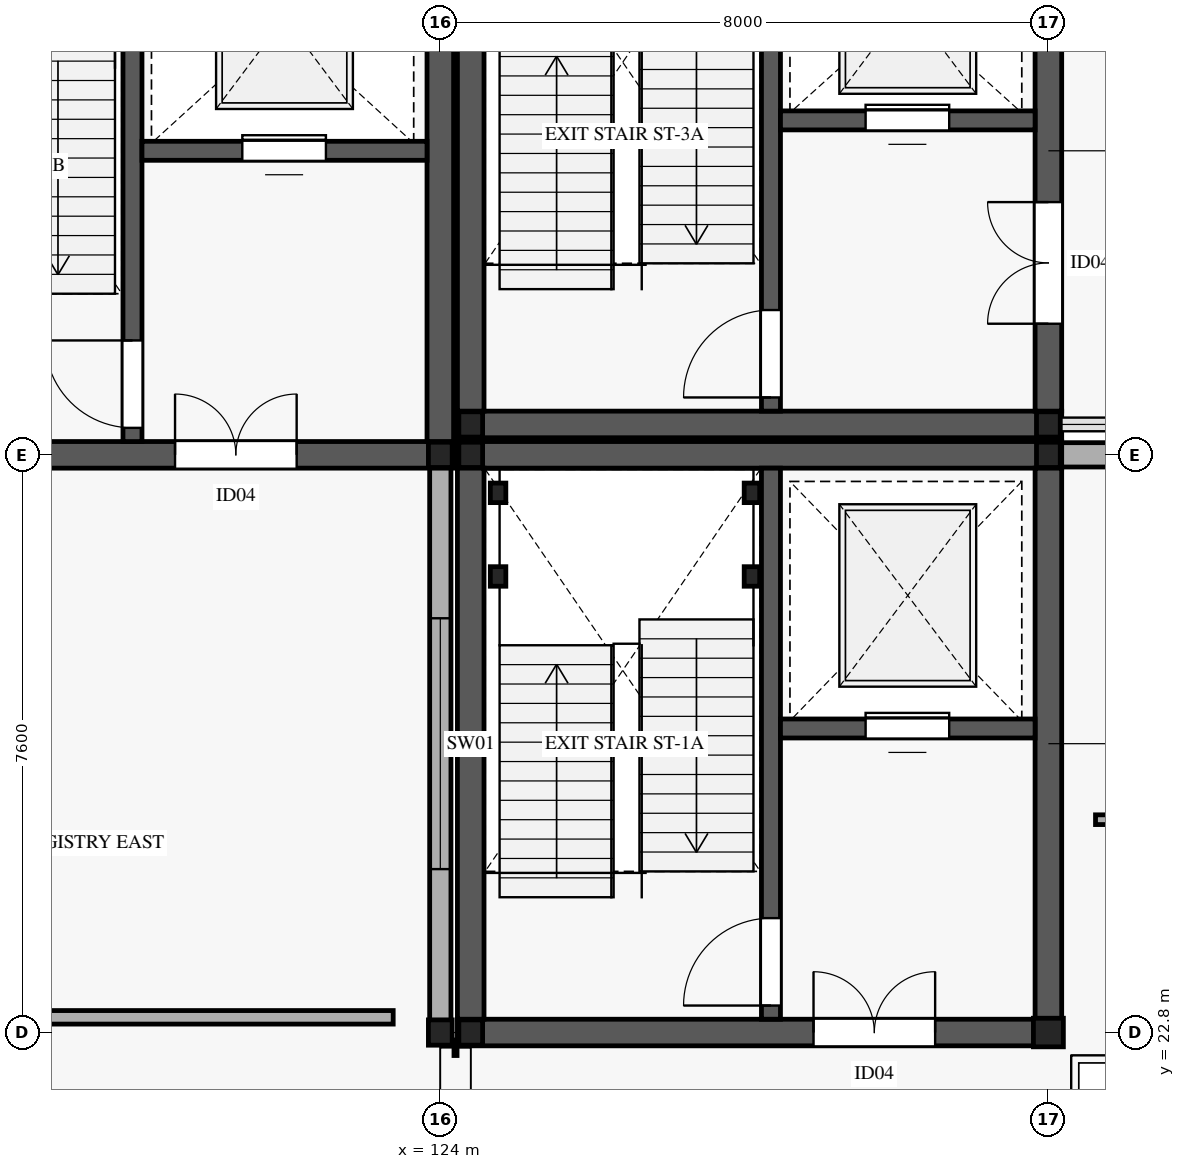
"""IFC4 building model, lengths in metres.
Left out: names, types, materials, properties, quantities, classifications, styles, units other than length and angle.
Written with IfcOpenShell. Run it as: python <this file> out.ifc"""

import sys

from ifc_helpers import new_model, si_unit, direction, frame, frame_2d, origin, origin_2d, place, context, subcontext, project, spatial, rectangle, i_section, extrude, element, fill, save


model = new_model("IFC4")
c1 = context("Model", 3, precision=1e-05, world=origin(), true_north=direction((0.0, 1.0)))
c2 = subcontext(c1, "Body", "Model", "MODEL_VIEW")
j1 = project(units=[si_unit("LENGTHUNIT", "METRE"), si_unit("PLANEANGLEUNIT", "RADIAN")], contexts=[c1])
p1 = place(None, origin())
s1 = spatial("IfcSite", under=j1, at=p1, CompositionType="ELEMENT")
p2 = place(p1, origin())
s2 = spatial("IfcBuilding", under=s1, at=p2, CompositionType="ELEMENT")
p3 = place(p2, frame((0.0, 0.0, 10.8)))
s3 = spatial("IfcBuildingStorey", under=s2, at=p3, CompositionType="ELEMENT", Elevation=10.8)
for number, where, z_axis, x_axis in (
    (1, (124.4, 22.8, 0.0), (0.0, 0.0, 1.0), (1.0, 0.0, 0.0)),
    (2, (124.4, 30.4, 0.0), (0.0, 0.0, 1.0), (1.0, 0.0, 0.0)),
):
    element("IfcColumn", number, at=place(p3, frame(where, z_axis=z_axis, x_axis=x_axis)), inside=s3, PredefinedType="COLUMN", context=c2, shape_type="SweptSolid", body=[
        extrude(i_section(OverallWidth=0.313, OverallDepth=0.333, WebThickness=0.018, FlangeThickness=0.028, FilletRadius=0.015, at=origin_2d()), origin(), (0.0, 0.0, 1.0), 4.59),
    ])
p4 = place(p3, frame((132.0, 22.8, 0.0), z_axis=(0.0, 0.0, 1.0), x_axis=(1.0, 0.0, 0.0)))
e3 = element("IfcColumn", 3, at=p4, inside=s3, PredefinedType="COLUMN", context=c2, shape_type="SweptSolid", body=[
    extrude(i_section(OverallWidth=0.394, OverallDepth=0.376, WebThickness=0.017, FlangeThickness=0.028, FilletRadius=0.015, at=origin_2d()), origin(), (0.0, 0.0, 1.0), 4.59),
])
for number, where, z_axis, x_axis in (
    (4, (132.0, 30.4, 0.0), (0.0, 0.0, 1.0), (1.0, 0.0, 0.0)),
    (5, (124.4, 30.8, 0.0), (0.0, 0.0, 1.0), (1.0, 0.0, 0.0)),
    (6, (132.0, 30.8, 0.0), (0.0, 0.0, 1.0), (1.0, 0.0, 0.0)),
    (7, (124.0, 22.8, 0.0), (0.0, 0.0, 1.0), (1.0, 0.0, 0.0)),
    (8, (124.0, 30.4, 0.0), (0.0, 0.0, 1.0), (1.0, 0.0, 0.0)),
):
    element("IfcColumn", number, at=place(p3, frame(where, z_axis=z_axis, x_axis=x_axis)), inside=s3, PredefinedType="COLUMN", context=c2, shape_type="SweptSolid", body=[
        extrude(i_section(OverallWidth=0.313, OverallDepth=0.333, WebThickness=0.018, FlangeThickness=0.028, FilletRadius=0.015, at=origin_2d()), origin(), (0.0, 0.0, 1.0), 4.59),
    ])
p5 = place(p3, frame((131.98, 30.4, 0.0), z_axis=(0.0, 0.0, 1.0), x_axis=(1.0, 0.0, 0.0)))
e9 = element("IfcWall", 9, at=p5, inside=s3, PredefinedType="STANDARD", context=c2, shape_type="SweptSolid", body=[
    extrude(rectangle(XDim=8.04, YDim=0.32, at=frame_2d((4.02, 0.0))), origin(), (0.0, 0.0, 1.0), 3.66),
])
p6 = place(p5, frame((3.37, 0.0, 0.75)))
e10 = element("IfcOpeningElement", 10, at=p6, cuts=e9, PredefinedType="OPENING", context=c2, shape_type="SweptSolid", body=[
    extrude(rectangle(XDim=1.3, YDim=1.55, at=frame_2d((0.65, 0.775))), frame((0.0, 0.17, 0.0), z_axis=(0.0, -1.0, 0.0), x_axis=(1.0, 0.0, 0.0)), (0.0, 0.0, 1.0), 0.34),
])
p7 = place(p3, frame((124.0, 30.42, 0.0), z_axis=(0.0, 0.0, 1.0), x_axis=(0.0, -1.0, 0.0)))
e11 = element("IfcWall", 11, at=p7, inside=s3, PredefinedType="STANDARD", context=c2, shape_type="SweptSolid", body=[
    extrude(rectangle(XDim=7.64, YDim=0.28, at=frame_2d((3.82, 0.0))), origin(), (0.0, 0.0, 1.0), 3.66),
])
p8 = place(p7, frame((2.17, 0.0, 0.75)))
e12 = element("IfcOpeningElement", 12, at=p8, cuts=e11, PredefinedType="OPENING", context=c2, shape_type="SweptSolid", body=[
    extrude(rectangle(XDim=3.3, YDim=2.15, at=frame_2d((1.65, 1.075))), frame((0.0, 0.15, 0.0), z_axis=(0.0, -1.0, 0.0), x_axis=(1.0, 0.0, 0.0)), (0.0, 0.0, 1.0), 0.3),
])
p9 = place(p3, frame((124.18, 22.6, 0.0), z_axis=(0.0, 0.0, 1.0), x_axis=(1.0, 0.0, 0.0)))
e13 = element("IfcWall", 13, at=p9, inside=s3, PredefinedType="STANDARD", context=c2, shape_type="SweptSolid", body=[
    extrude(rectangle(XDim=0.04, YDim=0.205, at=frame_2d((0.02, 0.0))), origin(), (0.0, 0.0, 1.0), 4.02),
])
p10 = place(p3, frame((124.225, 22.8, 0.0), z_axis=(0.0, 0.0, 1.0), x_axis=(1.0, 0.0, 0.0)))
e14 = element("IfcWall", 14, at=p10, inside=s3, PredefinedType="SHEAR", context=c2, shape_type="SweptSolid", body=[
    extrude(rectangle(XDim=7.95, YDim=0.35, at=frame_2d((3.975, 0.0))), origin(), (0.0, 0.0, 1.0), 4.59),
])
p11 = place(p10, frame((4.685, 0.0, 0.0)))
e15 = element("IfcOpeningElement", 15, at=p11, cuts=e14, PredefinedType="OPENING", context=c2, shape_type="SweptSolid", body=[
    extrude(rectangle(XDim=1.6, YDim=2.35, at=frame_2d((0.8, 1.175))), frame((0.0, 0.185, 0.0), z_axis=(0.0, -1.0, 0.0), x_axis=(1.0, 0.0, 0.0)), (0.0, 0.0, 1.0), 0.37),
])
p12 = place(p3, frame((124.225, 30.4, 0.0), z_axis=(0.0, 0.0, 1.0), x_axis=(1.0, 0.0, 0.0)))
e16 = element("IfcWall", 16, at=p12, inside=s3, PredefinedType="SHEAR", context=c2, shape_type="SweptSolid", body=[
    extrude(rectangle(XDim=7.95, YDim=0.35, at=frame_2d((3.975, 0.0))), origin(), (0.0, 0.0, 1.0), 4.59),
])
for number, where, z_axis, x_axis in (
    (17, (124.4, 22.975, 0.0), (0.0, 0.0, 1.0), (0.0, 1.0, 0.0)),
    (18, (132.0, 22.975, 0.0), (0.0, 0.0, 1.0), (0.0, 1.0, 0.0)),
):
    element("IfcWall", number, at=place(p3, frame(where, z_axis=z_axis, x_axis=x_axis)), inside=s3, PredefinedType="SHEAR", context=c2, shape_type="SweptSolid", body=[
        extrude(rectangle(XDim=7.25, YDim=0.35, at=frame_2d((3.625, 0.0))), origin(), (0.0, 0.0, 1.0), 4.59),
    ])
p13 = place(p3, frame((128.35, 22.975, 0.0), z_axis=(0.0, 0.0, 1.0), x_axis=(0.0, 1.0, 0.0)))
e19 = element("IfcWall", 19, at=p13, inside=s3, PredefinedType="SHEAR", context=c2, shape_type="SweptSolid", body=[
    extrude(rectangle(XDim=7.25, YDim=0.25, at=frame_2d((3.625, 0.0))), origin(), (0.0, 0.0, 1.0), 4.59),
])
p14 = place(p13, frame((0.18, 0.0, 0.0)))
e20 = element("IfcOpeningElement", 20, at=p14, cuts=e19, PredefinedType="OPENING", context=c2, shape_type="SweptSolid", body=[
    extrude(rectangle(XDim=1.15, YDim=2.2, at=frame_2d((0.575, 1.1))), frame((0.0, 0.135, 0.0), z_axis=(0.0, -1.0, 0.0), x_axis=(1.0, 0.0, 0.0)), (0.0, 0.0, 1.0), 0.27),
])
p15 = place(p3, frame((128.475, 26.8, 0.0), z_axis=(0.0, 0.0, 1.0), x_axis=(1.0, 0.0, 0.0)))
e21 = element("IfcWall", 21, at=p15, inside=s3, PredefinedType="SHEAR", context=c2, shape_type="SweptSolid", body=[
    extrude(rectangle(XDim=3.35, YDim=0.25, at=frame_2d((1.675, 0.0))), origin(), (0.0, 0.0, 1.0), 4.59),
])
p16 = place(p15, frame((1.12, 0.0, 0.0)))
e22 = element("IfcOpeningElement", 22, at=p16, cuts=e21, PredefinedType="OPENING", context=c2, shape_type="SweptSolid", body=[
    extrude(rectangle(XDim=1.1, YDim=2.2, at=frame_2d((0.55, 1.1))), frame((0.0, 0.135, 0.0), z_axis=(0.0, -1.0, 0.0), x_axis=(1.0, 0.0, 0.0)), (0.0, 0.0, 1.0), 0.27),
])
for number, where, z_axis, x_axis in (
    (23, (124.76, 28.8, 0.0), (0.0, 0.0, 1.0), (1.0, 0.0, 0.0)),
    (24, (128.1, 28.8, 0.0), (0.0, 0.0, 1.0), (1.0, 0.0, 0.0)),
    (25, (124.76, 29.9, 0.0), (0.0, 0.0, 1.0), (1.0, 0.0, 0.0)),
    (26, (128.1, 29.9, 0.0), (0.0, 0.0, 1.0), (1.0, 0.0, 0.0)),
):
    element("IfcColumn", number, at=place(p3, frame(where, z_axis=z_axis, x_axis=x_axis)), inside=s3, PredefinedType="COLUMN", context=c2, shape_type="SweptSolid", body=[
        extrude(i_section(OverallWidth=0.204, OverallDepth=0.257, WebThickness=0.009, FlangeThickness=0.016, FilletRadius=0.013, at=origin_2d()), origin(), (0.0, 0.0, 1.0), 4.795),
    ])
p17 = place(p3, frame((124.225, 30.8, 0.0), z_axis=(0.0, 0.0, 1.0), x_axis=(1.0, 0.0, 0.0)))
e27 = element("IfcWall", 27, at=p17, inside=s3, PredefinedType="SHEAR", context=c2, shape_type="SweptSolid", body=[
    extrude(rectangle(XDim=7.95, YDim=0.35, at=frame_2d((3.975, 0.0))), origin(), (0.0, 0.0, 1.0), 4.59),
])
p18 = place(p3, frame((124.4, 30.975, 0.0), z_axis=(0.0, 0.0, 1.0), x_axis=(0.0, 1.0, 0.0)))
e28 = element("IfcWall", 28, at=p18, inside=s3, PredefinedType="SHEAR", context=c2, shape_type="SweptSolid", body=[
    extrude(rectangle(XDim=6.85, YDim=0.35, at=frame_2d((3.425, 0.0))), origin(), (0.0, 0.0, 1.0), 4.59),
])
p19 = place(p3, frame((132.0, 30.975, 0.0), z_axis=(0.0, 0.0, 1.0), x_axis=(0.0, 1.0, 0.0)))
e29 = element("IfcWall", 29, at=p19, inside=s3, PredefinedType="SHEAR", context=c2, shape_type="SweptSolid", body=[
    extrude(rectangle(XDim=6.85, YDim=0.35, at=frame_2d((3.425, 0.0))), origin(), (0.0, 0.0, 1.0), 4.59),
])
p20 = place(p19, frame((1.15, 0.0, 0.0)))
e30 = element("IfcOpeningElement", 30, at=p20, cuts=e29, PredefinedType="OPENING", context=c2, shape_type="SweptSolid", body=[
    extrude(rectangle(XDim=1.6, YDim=2.35, at=frame_2d((0.8, 1.175))), frame((0.0, 0.185, 0.0), z_axis=(0.0, -1.0, 0.0), x_axis=(1.0, 0.0, 0.0)), (0.0, 0.0, 1.0), 0.37),
])
p21 = place(p3, frame((128.35, 30.975, 0.0), z_axis=(0.0, 0.0, 1.0), x_axis=(0.0, 1.0, 0.0)))
e31 = element("IfcWall", 31, at=p21, inside=s3, PredefinedType="SHEAR", context=c2, shape_type="SweptSolid", body=[
    extrude(rectangle(XDim=6.85, YDim=0.25, at=frame_2d((3.425, 0.0))), origin(), (0.0, 0.0, 1.0), 4.59),
])
p22 = place(p21, frame((0.18, 0.0, 0.0)))
e32 = element("IfcOpeningElement", 32, at=p22, cuts=e31, PredefinedType="OPENING", context=c2, shape_type="SweptSolid", body=[
    extrude(rectangle(XDim=1.15, YDim=2.2, at=frame_2d((0.575, 1.1))), frame((0.0, 0.135, 0.0), z_axis=(0.0, -1.0, 0.0), x_axis=(1.0, 0.0, 0.0)), (0.0, 0.0, 1.0), 0.27),
])
p23 = place(p3, frame((128.475, 34.8, 0.0), z_axis=(0.0, 0.0, 1.0), x_axis=(1.0, 0.0, 0.0)))
e33 = element("IfcWall", 33, at=p23, inside=s3, PredefinedType="SHEAR", context=c2, shape_type="SweptSolid", body=[
    extrude(rectangle(XDim=3.35, YDim=0.25, at=frame_2d((1.675, 0.0))), origin(), (0.0, 0.0, 1.0), 4.59),
])
p24 = place(p23, frame((1.12, 0.0, 0.0)))
e34 = element("IfcOpeningElement", 34, at=p24, cuts=e33, PredefinedType="OPENING", context=c2, shape_type="SweptSolid", body=[
    extrude(rectangle(XDim=1.1, YDim=2.2, at=frame_2d((0.55, 1.1))), frame((0.0, 0.135, 0.0), z_axis=(0.0, -1.0, 0.0), x_axis=(1.0, 0.0, 0.0)), (0.0, 0.0, 1.0), 0.27),
])
p25 = place(p3, frame((115.825, 30.4, 0.0), z_axis=(0.0, 0.0, 1.0), x_axis=(1.0, 0.0, 0.0)))
e35 = element("IfcWall", 35, at=p25, inside=s3, PredefinedType="SHEAR", context=c2, shape_type="SweptSolid", body=[
    extrude(rectangle(XDim=8.35, YDim=0.35, at=frame_2d((4.175, 0.0))), origin(), (0.0, 0.0, 1.0), 4.59),
])
p26 = place(p25, frame((4.685, 0.0, 0.0)))
e36 = element("IfcOpeningElement", 36, at=p26, cuts=e35, PredefinedType="OPENING", context=c2, shape_type="SweptSolid", body=[
    extrude(rectangle(XDim=1.6, YDim=2.35, at=frame_2d((0.8, 1.175))), frame((0.0, 0.185, 0.0), z_axis=(0.0, -1.0, 0.0), x_axis=(1.0, 0.0, 0.0)), (0.0, 0.0, 1.0), 0.37),
])
p27 = place(p3, frame((124.0, 30.575, 0.0), z_axis=(0.0, 0.0, 1.0), x_axis=(0.0, 1.0, 0.0)))
e37 = element("IfcWall", 37, at=p27, inside=s3, PredefinedType="SHEAR", context=c2, shape_type="SweptSolid", body=[
    extrude(rectangle(XDim=7.25, YDim=0.35, at=frame_2d((3.625, 0.0))), origin(), (0.0, 0.0, 1.0), 4.59),
])
p28 = place(p3, frame((119.95, 30.575, 0.0), z_axis=(0.0, 0.0, 1.0), x_axis=(0.0, 1.0, 0.0)))
e38 = element("IfcWall", 38, at=p28, inside=s3, PredefinedType="SHEAR", context=c2, shape_type="SweptSolid", body=[
    extrude(rectangle(XDim=7.25, YDim=0.25, at=frame_2d((3.625, 0.0))), origin(), (0.0, 0.0, 1.0), 4.59),
])
p29 = place(p28, frame((0.18, 0.0, 0.0)))
e39 = element("IfcOpeningElement", 39, at=p29, cuts=e38, PredefinedType="OPENING", context=c2, shape_type="SweptSolid", body=[
    extrude(rectangle(XDim=1.15, YDim=2.2, at=frame_2d((0.575, 1.1))), frame((0.0, 0.135, 0.0), z_axis=(0.0, -1.0, 0.0), x_axis=(1.0, 0.0, 0.0)), (0.0, 0.0, 1.0), 0.27),
])
p30 = place(p3, frame((120.075, 34.4, 0.0), z_axis=(0.0, 0.0, 1.0), x_axis=(1.0, 0.0, 0.0)))
e40 = element("IfcWall", 40, at=p30, inside=s3, PredefinedType="SHEAR", context=c2, shape_type="SweptSolid", body=[
    extrude(rectangle(XDim=3.75, YDim=0.25, at=frame_2d((1.875, 0.0))), origin(), (0.0, 0.0, 1.0), 4.59),
])
p31 = place(p30, frame((1.32, 0.0, 0.0)))
e41 = element("IfcOpeningElement", 41, at=p31, cuts=e40, PredefinedType="OPENING", context=c2, shape_type="SweptSolid", body=[
    extrude(rectangle(XDim=1.1, YDim=2.2, at=frame_2d((0.55, 1.1))), frame((0.0, 0.135, 0.0), z_axis=(0.0, -1.0, 0.0), x_axis=(1.0, 0.0, 0.0)), (0.0, 0.0, 1.0), 0.27),
])
p32 = place(p3, frame((132.62, 25.6, 0.0), z_axis=(0.0, 0.0, 1.0), x_axis=(1.0, 0.0, 0.0)))
e42 = element("IfcWall", 42, at=p32, inside=s3, PredefinedType="PARTITIONING", context=c2, shape_type="SweptSolid", body=[
    extrude(rectangle(XDim=30.76, YDim=0.128, at=frame_2d((15.38, 0.0))), origin(), (0.0, 0.0, 1.0), 3.45),
])
p33 = place(p32, frame((14.73, 0.0, 0.0)))
e43 = element("IfcOpeningElement", 43, at=p33, cuts=e42, PredefinedType="OPENING", context=c2, shape_type="SweptSolid", body=[
    extrude(rectangle(XDim=1.3, YDim=2.2, at=frame_2d((0.65, 1.1))), frame((0.0, 0.074, 0.0), z_axis=(0.0, -1.0, 0.0), x_axis=(1.0, 0.0, 0.0)), (0.0, 0.0, 1.0), 0.148),
])
p34 = place(p3, frame((111.62, 23.0, 0.0), z_axis=(0.0, 0.0, 1.0), x_axis=(1.0, 0.0, 0.0)))
e44 = element("IfcWall", 44, at=p34, inside=s3, PredefinedType="PARTITIONING", context=c2, shape_type="SweptSolid", body=[
    extrude(rectangle(XDim=11.76, YDim=0.178, at=frame_2d((5.88, 0.0))), origin(), (0.0, 0.0, 1.0), 3.45),
])
p35 = place(p34, frame((5.28, 0.0, 0.0)))
e45 = element("IfcOpeningElement", 45, at=p35, cuts=e44, PredefinedType="OPENING", context=c2, shape_type="SweptSolid", body=[
    extrude(rectangle(XDim=1.2, YDim=2.2, at=frame_2d((0.6, 1.1))), frame((0.0, 0.099, 0.0), z_axis=(0.0, -1.0, 0.0), x_axis=(1.0, 0.0, 0.0)), (0.0, 0.0, 1.0), 0.198),
])
p36 = place(p8, origin())
e46 = element("IfcWindow", 46, at=p36, inside=s3, PartitioningType="SINGLE_PANEL", PredefinedType="WINDOW", context=c2, shape_type="SweptSolid", body=[
    extrude(rectangle(XDim=3.3, YDim=2.15, at=frame_2d((1.65, 1.075))), frame((0.0, 0.03, 0.0), z_axis=(0.0, -1.0, 0.0), x_axis=(1.0, 0.0, 0.0)), (0.0, 0.0, 1.0), 0.06),
])
fill(e12, e46)
p37 = place(p14, origin())
e47 = element("IfcDoor", 47, at=p37, inside=s3, OperationType="SINGLE_SWING_LEFT", PredefinedType="DOOR", context=c2, shape_type="SweptSolid", body=[
    extrude(rectangle(XDim=1.15, YDim=2.2, at=frame_2d((0.575, 1.1))), frame((0.0, 0.025, 0.0), z_axis=(0.0, -1.0, 0.0), x_axis=(1.0, 0.0, 0.0)), (0.0, 0.0, 1.0), 0.05),
])
fill(e20, e47)
p38 = place(p11, origin())
e48 = element("IfcDoor", 48, at=p38, inside=s3, OperationType="DOUBLE_DOOR_SINGLE_SWING", PredefinedType="DOOR", context=c2, shape_type="SweptSolid", body=[
    extrude(rectangle(XDim=1.6, YDim=2.35, at=frame_2d((0.8, 1.175))), frame((0.0, 0.025, 0.0), z_axis=(0.0, -1.0, 0.0), x_axis=(1.0, 0.0, 0.0)), (0.0, 0.0, 1.0), 0.05),
])
fill(e15, e48)
p39 = place(p16, origin())
e49 = element("IfcDoor", 49, at=p39, inside=s3, OperationType="SLIDING_TO_LEFT", PredefinedType="DOOR", context=c2, shape_type="SweptSolid", body=[
    extrude(rectangle(XDim=1.1, YDim=2.2, at=frame_2d((0.55, 1.1))), frame((0.0, 0.025, 0.0), z_axis=(0.0, -1.0, 0.0), x_axis=(1.0, 0.0, 0.0)), (0.0, 0.0, 1.0), 0.05),
])
fill(e22, e49)
p40 = place(p22, origin())
e50 = element("IfcDoor", 50, at=p40, inside=s3, OperationType="SINGLE_SWING_LEFT", PredefinedType="DOOR", context=c2, shape_type="SweptSolid", body=[
    extrude(rectangle(XDim=1.15, YDim=2.2, at=frame_2d((0.575, 1.1))), frame((0.0, 0.025, 0.0), z_axis=(0.0, -1.0, 0.0), x_axis=(1.0, 0.0, 0.0)), (0.0, 0.0, 1.0), 0.05),
])
fill(e32, e50)
p41 = place(p20, origin())
e51 = element("IfcDoor", 51, at=p41, inside=s3, OperationType="DOUBLE_DOOR_SINGLE_SWING", PredefinedType="DOOR", context=c2, shape_type="SweptSolid", body=[
    extrude(rectangle(XDim=1.6, YDim=2.35, at=frame_2d((0.8, 1.175))), frame((0.0, 0.025, 0.0), z_axis=(0.0, -1.0, 0.0), x_axis=(1.0, 0.0, 0.0)), (0.0, 0.0, 1.0), 0.05),
])
fill(e30, e51)
p42 = place(p24, origin())
e52 = element("IfcDoor", 52, at=p42, inside=s3, OperationType="SLIDING_TO_LEFT", PredefinedType="DOOR", context=c2, shape_type="SweptSolid", body=[
    extrude(rectangle(XDim=1.1, YDim=2.2, at=frame_2d((0.55, 1.1))), frame((0.0, 0.025, 0.0), z_axis=(0.0, -1.0, 0.0), x_axis=(1.0, 0.0, 0.0)), (0.0, 0.0, 1.0), 0.05),
])
fill(e34, e52)
p43 = place(p29, origin())
e53 = element("IfcDoor", 53, at=p43, inside=s3, OperationType="SINGLE_SWING_RIGHT", PredefinedType="DOOR", context=c2, shape_type="SweptSolid", body=[
    extrude(rectangle(XDim=1.15, YDim=2.2, at=frame_2d((0.575, 1.1))), frame((0.0, 0.025, 0.0), z_axis=(0.0, -1.0, 0.0), x_axis=(1.0, 0.0, 0.0)), (0.0, 0.0, 1.0), 0.05),
])
fill(e39, e53)
p44 = place(p26, origin())
e54 = element("IfcDoor", 54, at=p44, inside=s3, OperationType="DOUBLE_DOOR_SINGLE_SWING", PredefinedType="DOOR", context=c2, shape_type="SweptSolid", body=[
    extrude(rectangle(XDim=1.6, YDim=2.35, at=frame_2d((0.8, 1.175))), frame((0.0, 0.025, 0.0), z_axis=(0.0, -1.0, 0.0), x_axis=(1.0, 0.0, 0.0)), (0.0, 0.0, 1.0), 0.05),
])
fill(e36, e54)
p45 = place(p31, origin())
e55 = element("IfcDoor", 55, at=p45, inside=s3, OperationType="SLIDING_TO_LEFT", PredefinedType="DOOR", context=c2, shape_type="SweptSolid", body=[
    extrude(rectangle(XDim=1.1, YDim=2.2, at=frame_2d((0.55, 1.1))), frame((0.0, 0.025, 0.0), z_axis=(0.0, -1.0, 0.0), x_axis=(1.0, 0.0, 0.0)), (0.0, 0.0, 1.0), 0.05),
])
fill(e41, e55)
save(model, sys.argv[1])
